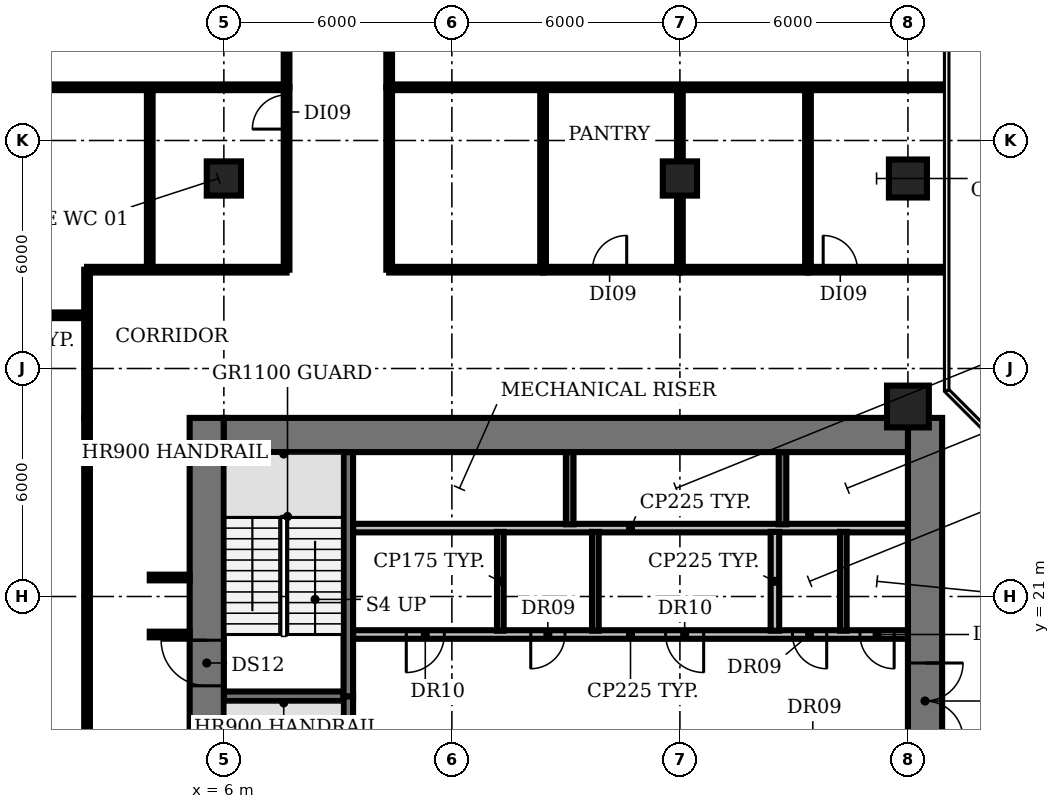
"""IFC4 building model, lengths in metres.
Left out: names, types, materials, properties, quantities, classifications, styles, units other than length and angle.
Written with IfcOpenShell. Run it as: python <this file> out.ifc"""

import sys

from ifc_helpers import new_model, si_unit, direction, frame, frame_2d, origin, origin_2d, place, context, subcontext, project, spatial, rectangle, circle, extrude, element, fill, save


model = new_model("IFC4")
c1 = context("Model", 3, precision=1e-05, world=origin(), true_north=direction((0.0, 1.0)))
c2 = subcontext(c1, "Body", "Model", "MODEL_VIEW")
j1 = project(units=[si_unit("LENGTHUNIT", "METRE"), si_unit("PLANEANGLEUNIT", "RADIAN")], contexts=[c1])
p1 = place(None, origin())
s1 = spatial("IfcSite", under=j1, at=p1, CompositionType="ELEMENT")
p2 = place(p1, origin())
s2 = spatial("IfcBuilding", under=s1, at=p2, CompositionType="ELEMENT")
p3 = place(p2, frame((0.0, 0.0, 15.5)))
s3 = spatial("IfcBuildingStorey", under=s2, at=p3, CompositionType="ELEMENT", Elevation=15.5)
for number, where, z_axis, x_axis in (
    (1, (6.0, 32.0, 0.0), (0.0, 0.0, 1.0), (1.0, 0.0, 0.0)),
    (2, (18.0, 32.0, 0.0), (0.0, 0.0, 1.0), (1.0, 0.0, 0.0)),
):
    element("IfcColumn", number, at=place(p3, frame(where, z_axis=z_axis, x_axis=x_axis)), inside=s3, PredefinedType="COLUMN", context=c2, shape_type="SweptSolid", body=[
        extrude(rectangle(XDim=0.9, YDim=0.9, at=origin_2d()), origin(), (0.0, 0.0, 1.0), 4.15),
    ])
p4 = place(p3, frame((24.0, 26.0, 0.0), z_axis=(0.0, 0.0, 1.0), x_axis=(1.0, 0.0, 0.0)))
e3 = element("IfcColumn", 3, at=p4, inside=s3, PredefinedType="COLUMN", context=c2, shape_type="SweptSolid", body=[
    extrude(circle(Radius=0.55, at=origin_2d()), origin(), (0.0, 0.0, 1.0), 4.15),
])
p5 = place(p3, frame((24.0, 32.0, 0.0), z_axis=(0.0, 0.0, 1.0), x_axis=(1.0, 0.0, 0.0)))
e4 = element("IfcColumn", 4, at=p5, inside=s3, PredefinedType="COLUMN", context=c2, shape_type="SweptSolid", body=[
    extrude(rectangle(XDim=1.0, YDim=1.0, at=origin_2d()), origin(), (0.0, 0.0, 1.0), 4.15),
])
p6 = place(p3, frame((6.0, 18.375, 0.0), z_axis=(0.0, 0.0, 1.0), x_axis=(1.0, 0.0, 0.0)))
e5 = element("IfcWall", 5, at=p6, inside=s3, PredefinedType="SHEAR", context=c2, shape_type="SweptSolid", body=[
    extrude(rectangle(XDim=3.15, YDim=0.25, at=frame_2d((1.575, 0.0))), origin(), (0.0, 0.0, 1.0), 4.15),
])
p7 = place(p3, frame((24.0, 20.0, 0.0), z_axis=(0.0, 0.0, 1.0), x_axis=(-1.0, 0.0, 0.0)))
e6 = element("IfcWall", 6, at=p7, inside=s3, PredefinedType="PARTITIONING", context=c2, shape_type="SweptSolid", body=[
    extrude(rectangle(XDim=14.6, YDim=0.225, at=frame_2d((7.3, 0.0))), origin(), (0.0, 0.0, 1.0), 4.15),
])
p8 = place(p7, frame((12.2, 0.0, 0.0)))
e7 = element("IfcOpeningElement", 7, at=p8, cuts=e6, PredefinedType="OPENING", context=c2, shape_type="SweptSolid", body=[
    extrude(rectangle(XDim=1.0, YDim=2.1, at=frame_2d((0.5, 1.05))), frame((0.0, 0.123, 0.0), z_axis=(0.0, -1.0, 0.0), x_axis=(1.0, 0.0, 0.0)), (0.0, 0.0, 1.0), 0.245),
])
p9 = place(p7, frame((9.025, 0.0, 0.0)))
e8 = element("IfcOpeningElement", 8, at=p9, cuts=e6, PredefinedType="OPENING", context=c2, shape_type="SweptSolid", body=[
    extrude(rectangle(XDim=0.9, YDim=2.1, at=frame_2d((0.45, 1.05))), frame((0.0, 0.123, 0.0), z_axis=(0.0, -1.0, 0.0), x_axis=(1.0, 0.0, 0.0)), (0.0, 0.0, 1.0), 0.245),
])
p10 = place(p7, frame((5.375, 0.0, 0.0)))
e9 = element("IfcOpeningElement", 9, at=p10, cuts=e6, PredefinedType="OPENING", context=c2, shape_type="SweptSolid", body=[
    extrude(rectangle(XDim=1.0, YDim=2.1, at=frame_2d((0.5, 1.05))), frame((0.0, 0.123, 0.0), z_axis=(0.0, -1.0, 0.0), x_axis=(1.0, 0.0, 0.0)), (0.0, 0.0, 1.0), 0.245),
])
p11 = place(p7, frame((2.137, 0.0, 0.0)))
e10 = element("IfcOpeningElement", 10, at=p11, cuts=e6, PredefinedType="OPENING", context=c2, shape_type="SweptSolid", body=[
    extrude(rectangle(XDim=0.9, YDim=2.1, at=frame_2d((0.45, 1.05))), frame((0.0, 0.123, 0.0), z_axis=(0.0, -1.0, 0.0), x_axis=(1.0, 0.0, 0.0)), (0.0, 0.0, 1.0), 0.245),
])
p12 = place(p7, frame((0.363, 0.0, 0.0)))
e11 = element("IfcOpeningElement", 11, at=p12, cuts=e6, PredefinedType="OPENING", context=c2, shape_type="SweptSolid", body=[
    extrude(rectangle(XDim=0.9, YDim=2.1, at=frame_2d((0.45, 1.05))), frame((0.0, 0.123, 0.0), z_axis=(0.0, -1.0, 0.0), x_axis=(1.0, 0.0, 0.0)), (0.0, 0.0, 1.0), 0.245),
])
p13 = place(p3, frame((9.4, 22.8, 0.0), z_axis=(0.0, 0.0, 1.0), x_axis=(1.0, 0.0, 0.0)))
e12 = element("IfcWall", 12, at=p13, inside=s3, PredefinedType="PARTITIONING", context=c2, shape_type="SweptSolid", body=[
    extrude(rectangle(XDim=14.6, YDim=0.225, at=frame_2d((7.3, 0.0))), origin(), (0.0, 0.0, 1.0), 4.15),
])
p14 = place(p3, frame((9.275, 18.375, 0.0), z_axis=(0.0, 0.0, 1.0), x_axis=(0.0, -1.0, 0.0)))
e13 = element("IfcWall", 13, at=p14, inside=s3, PredefinedType="SHEAR", context=c2, shape_type="SweptSolid", body=[
    extrude(rectangle(XDim=6.55, YDim=0.25, at=frame_2d((3.275, 0.0))), origin(), (0.0, 0.0, 1.0), 4.15),
])
p15 = place(p14, frame((5.075, 0.0, 0.0)))
e14 = element("IfcOpeningElement", 14, at=p15, cuts=e13, PredefinedType="OPENING", context=c2, shape_type="SweptSolid", body=[
    extrude(rectangle(XDim=1.0, YDim=2.1, at=frame_2d((0.5, 1.05))), frame((0.0, 0.135, 0.0), z_axis=(0.0, -1.0, 0.0), x_axis=(1.0, 0.0, 0.0)), (0.0, 0.0, 1.0), 0.27),
])
p16 = place(p3, frame((9.275, 18.375, 0.0), z_axis=(0.0, 0.0, 1.0), x_axis=(0.0, 1.0, 0.0)))
e15 = element("IfcWall", 15, at=p16, inside=s3, PredefinedType="SHEAR", context=c2, shape_type="SweptSolid", body=[
    extrude(rectangle(XDim=6.425, YDim=0.25, at=frame_2d((3.212, 0.0))), origin(), (0.0, 0.0, 1.0), 4.15),
])
p17 = place(p3, frame((13.275, 20.1, 0.0), z_axis=(0.0, 0.0, 1.0), x_axis=(0.0, 1.0, 0.0)))
e16 = element("IfcWall", 16, at=p17, inside=s3, PredefinedType="PARTITIONING", context=c2, shape_type="SweptSolid", body=[
    extrude(rectangle(XDim=2.6, YDim=0.175, at=frame_2d((1.3, 0.0))), origin(), (0.0, 0.0, 1.0), 4.15),
])
p18 = place(p3, frame((15.1, 22.9, 0.0), z_axis=(0.0, 0.0, 1.0), x_axis=(0.0, 1.0, 0.0)))
e17 = element("IfcWall", 17, at=p18, inside=s3, PredefinedType="SHEAR", context=c2, shape_type="SweptSolid", body=[
    extrude(rectangle(XDim=1.9, YDim=0.2, at=frame_2d((0.95, 0.0))), origin(), (0.0, 0.0, 1.0), 4.15),
])
p19 = place(p3, frame((15.775, 20.1, 0.0), z_axis=(0.0, 0.0, 1.0), x_axis=(0.0, 1.0, 0.0)))
e18 = element("IfcWall", 18, at=p19, inside=s3, PredefinedType="PARTITIONING", context=c2, shape_type="SweptSolid", body=[
    extrude(rectangle(XDim=2.6, YDim=0.175, at=frame_2d((1.3, 0.0))), origin(), (0.0, 0.0, 1.0), 4.15),
])
p20 = place(p3, frame((20.5, 20.1, 0.0), z_axis=(0.0, 0.0, 1.0), x_axis=(0.0, 1.0, 0.0)))
e19 = element("IfcWall", 19, at=p20, inside=s3, PredefinedType="PARTITIONING", context=c2, shape_type="SweptSolid", body=[
    extrude(rectangle(XDim=2.6, YDim=0.225, at=frame_2d((1.3, 0.0))), origin(), (0.0, 0.0, 1.0), 4.15),
])
p21 = place(p3, frame((20.7, 22.9, 0.0), z_axis=(0.0, 0.0, 1.0), x_axis=(0.0, 1.0, 0.0)))
e20 = element("IfcWall", 20, at=p21, inside=s3, PredefinedType="SHEAR", context=c2, shape_type="SweptSolid", body=[
    extrude(rectangle(XDim=1.9, YDim=0.2, at=frame_2d((0.95, 0.0))), origin(), (0.0, 0.0, 1.0), 4.15),
])
p22 = place(p3, frame((22.3, 20.1, 0.0), z_axis=(0.0, 0.0, 1.0), x_axis=(0.0, 1.0, 0.0)))
e21 = element("IfcWall", 21, at=p22, inside=s3, PredefinedType="PARTITIONING", context=c2, shape_type="SweptSolid", body=[
    extrude(rectangle(XDim=2.6, YDim=0.175, at=frame_2d((1.3, 0.0))), origin(), (0.0, 0.0, 1.0), 4.15),
])
p23 = place(p3, frame((5.55, 4.5, 0.0), z_axis=(0.0, 0.0, 1.0), x_axis=(0.0, 1.0, 0.0)))
e22 = element("IfcWall", 22, at=p23, inside=s3, PredefinedType="SHEAR", context=c2, shape_type="SweptSolid", body=[
    extrude(rectangle(XDim=21.2, YDim=0.9, at=frame_2d((10.6, 0.0))), origin(), (0.0, 0.0, 1.0), 4.15),
])
p24 = place(p23, frame((7.6, 0.0, 0.0)))
e23 = element("IfcOpeningElement", 23, at=p24, cuts=e22, PredefinedType="OPENING", context=c2, shape_type="SweptSolid", body=[
    extrude(rectangle(XDim=1.2, YDim=2.1, at=frame_2d((0.6, 1.05))), frame((0.0, 0.46, 0.0), z_axis=(0.0, -1.0, 0.0), x_axis=(1.0, 0.0, 0.0)), (0.0, 0.0, 1.0), 0.92),
])
p25 = place(p23, frame((14.15, 0.0, 0.0)))
e24 = element("IfcOpeningElement", 24, at=p25, cuts=e22, PredefinedType="OPENING", context=c2, shape_type="SweptSolid", body=[
    extrude(rectangle(XDim=1.2, YDim=2.1, at=frame_2d((0.6, 1.05))), frame((0.0, 0.46, 0.0), z_axis=(0.0, -1.0, 0.0), x_axis=(1.0, 0.0, 0.0)), (0.0, 0.0, 1.0), 0.92),
])
p26 = place(p3, frame((24.45, 25.7, 0.0), z_axis=(0.0, 0.0, 1.0), x_axis=(0.0, -1.0, 0.0)))
e25 = element("IfcWall", 25, at=p26, inside=s3, PredefinedType="SHEAR", context=c2, shape_type="SweptSolid", body=[
    extrude(rectangle(XDim=21.2, YDim=0.9, at=frame_2d((10.6, 0.0))), origin(), (0.0, 0.0, 1.0), 4.15),
])
p27 = place(p26, frame((12.45, 0.0, 0.0)))
e26 = element("IfcOpeningElement", 26, at=p27, cuts=e25, PredefinedType="OPENING", context=c2, shape_type="SweptSolid", body=[
    extrude(rectangle(XDim=0.9, YDim=2.1, at=frame_2d((0.45, 1.05))), frame((0.0, 0.46, 0.0), z_axis=(0.0, -1.0, 0.0), x_axis=(1.0, 0.0, 0.0)), (0.0, 0.0, 1.0), 0.92),
])
p28 = place(p26, frame((6.45, 0.0, 0.0)))
e27 = element("IfcOpeningElement", 27, at=p28, cuts=e25, PredefinedType="OPENING", context=c2, shape_type="SweptSolid", body=[
    extrude(rectangle(XDim=2.0, YDim=2.1, at=frame_2d((1.0, 1.05))), frame((0.0, 0.46, 0.0), z_axis=(0.0, -1.0, 0.0), x_axis=(1.0, 0.0, 0.0)), (0.0, 0.0, 1.0), 0.92),
])
p29 = place(p3, frame((6.0, 25.25, 0.0), z_axis=(0.0, 0.0, 1.0), x_axis=(1.0, 0.0, 0.0)))
e28 = element("IfcWall", 28, at=p29, inside=s3, PredefinedType="SHEAR", context=c2, shape_type="SweptSolid", body=[
    extrude(rectangle(XDim=18.0, YDim=0.9, at=frame_2d((9.0, 0.0))), origin(), (0.0, 0.0, 1.0), 4.15),
])
p30 = place(p3, frame((-0.97, 28.4, 0.0), z_axis=(0.0, 0.0, 1.0), x_axis=(1.0, 0.0, 0.0)))
e29 = element("IfcWall", 29, at=p30, inside=s3, PredefinedType="PARTITIONING", context=c2, shape_type="SweptSolid", body=[
    extrude(rectangle(XDim=3.37, YDim=0.15, at=frame_2d((1.685, 0.0))), origin(), (0.0, 0.0, 1.0), 3.08),
])
p31 = place(p3, frame((-0.97, 34.4, 0.0), z_axis=(0.0, 0.0, 1.0), x_axis=(1.0, 0.0, 0.0)))
e30 = element("IfcWall", 30, at=p31, inside=s3, PredefinedType="PARTITIONING", context=c2, shape_type="SweptSolid", body=[
    extrude(rectangle(XDim=8.62, YDim=0.15, at=frame_2d((4.31, 0.0))), origin(), (0.0, 0.0, 1.0), 3.08),
])
p32 = place(p3, frame((2.4, 4.5, 0.0), z_axis=(0.0, 0.0, 1.0), x_axis=(0.0, 1.0, 0.0)))
e31 = element("IfcWall", 31, at=p32, inside=s3, PredefinedType="PARTITIONING", context=c2, shape_type="SweptSolid", body=[
    extrude(rectangle(XDim=21.2, YDim=0.15, at=frame_2d((10.6, 0.0))), origin(), (0.0, 0.0, 1.0), 3.08),
])
p33 = place(p32, frame((10.8, 0.0, 0.0)))
e32 = element("IfcOpeningElement", 32, at=p33, cuts=e31, PredefinedType="OPENING", context=c2, shape_type="SweptSolid", body=[
    extrude(rectangle(XDim=1.2, YDim=2.1, at=frame_2d((0.6, 1.05))), frame((0.0, 0.085, 0.0), z_axis=(0.0, -1.0, 0.0), x_axis=(1.0, 0.0, 0.0)), (0.0, 0.0, 1.0), 0.17),
])
p34 = place(p3, frame((2.4, 25.7, 0.0), z_axis=(0.0, 0.0, 1.0), x_axis=(0.0, 1.0, 0.0)))
e33 = element("IfcWall", 33, at=p34, inside=s3, PredefinedType="PARTITIONING", context=c2, shape_type="SweptSolid", body=[
    extrude(rectangle(XDim=3.9, YDim=0.15, at=frame_2d((1.95, 0.0))), origin(), (0.0, 0.0, 1.0), 3.08),
])
p35 = place(p3, frame((2.4, 29.6, 0.0), z_axis=(0.0, 0.0, 1.0), x_axis=(1.0, 0.0, 0.0)))
e34 = element("IfcWall", 34, at=p35, inside=s3, PredefinedType="PARTITIONING", context=c2, shape_type="SweptSolid", body=[
    extrude(rectangle(XDim=5.25, YDim=0.15, at=frame_2d((2.625, 0.0))), origin(), (0.0, 0.0, 1.0), 3.08),
])
for number, where, z_axis, x_axis in (
    (35, (4.05, 20.0, 0.0), (0.0, 0.0, 1.0), (1.0, 0.0, 0.0)),
    (36, (4.05, 21.5, 0.0), (0.0, 0.0, 1.0), (1.0, 0.0, 0.0)),
):
    element("IfcWall", number, at=place(p3, frame(where, z_axis=z_axis, x_axis=x_axis)), inside=s3, PredefinedType="PARTITIONING", context=c2, shape_type="SweptSolid", body=[
        extrude(rectangle(XDim=1.05, YDim=0.15, at=frame_2d((0.525, 0.0))), origin(), (0.0, 0.0, 1.0), 3.08),
    ])
p36 = place(p3, frame((4.05, 29.6, 0.0), z_axis=(0.0, 0.0, 1.0), x_axis=(0.0, 1.0, 0.0)))
e37 = element("IfcWall", 37, at=p36, inside=s3, PredefinedType="PARTITIONING", context=c2, shape_type="SweptSolid", body=[
    extrude(rectangle(XDim=4.8, YDim=0.15, at=frame_2d((2.4, 0.0))), origin(), (0.0, 0.0, 1.0), 3.08),
])
p37 = place(p3, frame((7.65, 29.6, 0.0), z_axis=(0.0, 0.0, 1.0), x_axis=(0.0, 1.0, 0.0)))
e38 = element("IfcWall", 38, at=p37, inside=s3, PredefinedType="PARTITIONING", context=c2, shape_type="SweptSolid", body=[
    extrude(rectangle(XDim=4.8, YDim=0.15, at=frame_2d((2.4, 0.0))), origin(), (0.0, 0.0, 1.0), 3.08),
])
p38 = place(p37, frame((3.7, 0.0, 0.0)))
e39 = element("IfcOpeningElement", 39, at=p38, cuts=e38, PredefinedType="OPENING", context=c2, shape_type="SweptSolid", body=[
    extrude(rectangle(XDim=0.9, YDim=2.1, at=frame_2d((0.45, 1.05))), frame((0.0, 0.085, 0.0), z_axis=(0.0, -1.0, 0.0), x_axis=(1.0, 0.0, 0.0)), (0.0, 0.0, 1.0), 0.17),
])
p39 = place(p3, frame((7.65, 34.4, 0.0), z_axis=(0.0, 0.0, 1.0), x_axis=(0.0, 1.0, 0.0)))
e40 = element("IfcWall", 40, at=p39, inside=s3, PredefinedType="PARTITIONING", context=c2, shape_type="SweptSolid", body=[
    extrude(rectangle(XDim=4.6, YDim=0.15, at=frame_2d((2.3, 0.0))), origin(), (0.0, 0.0, 1.0), 3.08),
])
p40 = place(p39, frame((1.7, 0.0, 0.0)))
e41 = element("IfcOpeningElement", 41, at=p40, cuts=e40, PredefinedType="OPENING", context=c2, shape_type="SweptSolid", body=[
    extrude(rectangle(XDim=0.9, YDim=2.1, at=frame_2d((0.45, 1.05))), frame((0.0, 0.085, 0.0), z_axis=(0.0, -1.0, 0.0), x_axis=(1.0, 0.0, 0.0)), (0.0, 0.0, 1.0), 0.17),
])
p41 = place(p3, frame((10.35, 29.6, 0.0), z_axis=(0.0, 0.0, 1.0), x_axis=(0.0, 1.0, 0.0)))
e42 = element("IfcWall", 42, at=p41, inside=s3, PredefinedType="PARTITIONING", context=c2, shape_type="SweptSolid", body=[
    extrude(rectangle(XDim=4.8, YDim=0.15, at=frame_2d((2.4, 0.0))), origin(), (0.0, 0.0, 1.0), 3.08),
])
p42 = place(p3, frame((10.35, 29.6, 0.0), z_axis=(0.0, 0.0, 1.0), x_axis=(1.0, 0.0, 0.0)))
e43 = element("IfcWall", 43, at=p42, inside=s3, PredefinedType="PARTITIONING", context=c2, shape_type="SweptSolid", body=[
    extrude(rectangle(XDim=4.05, YDim=0.15, at=frame_2d((2.025, 0.0))), origin(), (0.0, 0.0, 1.0), 3.08),
])
p43 = place(p3, frame((10.35, 34.4, 0.0), z_axis=(0.0, 0.0, 1.0), x_axis=(1.0, 0.0, 0.0)))
e44 = element("IfcWall", 44, at=p43, inside=s3, PredefinedType="PARTITIONING", context=c2, shape_type="SweptSolid", body=[
    extrude(rectangle(XDim=14.62, YDim=0.15, at=frame_2d((7.31, 0.0))), origin(), (0.0, 0.0, 1.0), 3.08),
])
p44 = place(p3, frame((10.35, 51.0, 0.0), z_axis=(0.0, 0.0, 1.0), x_axis=(0.0, -1.0, 0.0)))
e45 = element("IfcWall", 45, at=p44, inside=s3, PredefinedType="PARTITIONING", context=c2, shape_type="SweptSolid", body=[
    extrude(rectangle(XDim=16.6, YDim=0.15, at=frame_2d((8.3, 0.0))), origin(), (0.0, 0.0, 1.0), 3.08),
])
p45 = place(p44, frame((7.7, 0.0, 0.0)))
e46 = element("IfcOpeningElement", 46, at=p45, cuts=e45, PredefinedType="OPENING", context=c2, shape_type="SweptSolid", body=[
    extrude(rectangle(XDim=1.2, YDim=2.1, at=frame_2d((0.6, 1.05))), frame((0.0, 0.085, 0.0), z_axis=(0.0, -1.0, 0.0), x_axis=(1.0, 0.0, 0.0)), (0.0, 0.0, 1.0), 0.17),
])
p46 = place(p3, frame((14.4, 29.6, 0.0), z_axis=(0.0, 0.0, 1.0), x_axis=(0.0, 1.0, 0.0)))
e47 = element("IfcWall", 47, at=p46, inside=s3, PredefinedType="PARTITIONING", context=c2, shape_type="SweptSolid", body=[
    extrude(rectangle(XDim=4.8, YDim=0.15, at=frame_2d((2.4, 0.0))), origin(), (0.0, 0.0, 1.0), 3.08),
])
p47 = place(p3, frame((14.4, 29.6, 0.0), z_axis=(0.0, 0.0, 1.0), x_axis=(1.0, 0.0, 0.0)))
e48 = element("IfcWall", 48, at=p47, inside=s3, PredefinedType="PARTITIONING", context=c2, shape_type="SweptSolid", body=[
    extrude(rectangle(XDim=3.6, YDim=0.15, at=frame_2d((1.8, 0.0))), origin(), (0.0, 0.0, 1.0), 3.08),
])
p48 = place(p47, frame((1.3, 0.0, 0.0)))
e49 = element("IfcOpeningElement", 49, at=p48, cuts=e48, PredefinedType="OPENING", context=c2, shape_type="SweptSolid", body=[
    extrude(rectangle(XDim=0.9, YDim=2.1, at=frame_2d((0.45, 1.05))), frame((0.0, 0.085, 0.0), z_axis=(0.0, -1.0, 0.0), x_axis=(1.0, 0.0, 0.0)), (0.0, 0.0, 1.0), 0.17),
])
p49 = place(p3, frame((18.0, 29.6, 0.0), z_axis=(0.0, 0.0, 1.0), x_axis=(0.0, 1.0, 0.0)))
e50 = element("IfcWall", 50, at=p49, inside=s3, PredefinedType="PARTITIONING", context=c2, shape_type="SweptSolid", body=[
    extrude(rectangle(XDim=4.8, YDim=0.15, at=frame_2d((2.4, 0.0))), origin(), (0.0, 0.0, 1.0), 3.08),
])
p50 = place(p3, frame((18.0, 29.6, 0.0), z_axis=(0.0, 0.0, 1.0), x_axis=(1.0, 0.0, 0.0)))
e51 = element("IfcWall", 51, at=p50, inside=s3, PredefinedType="PARTITIONING", context=c2, shape_type="SweptSolid", body=[
    extrude(rectangle(XDim=3.37, YDim=0.15, at=frame_2d((1.685, 0.0))), origin(), (0.0, 0.0, 1.0), 3.08),
])
p51 = place(p3, frame((21.37, 29.6, 0.0), z_axis=(0.0, 0.0, 1.0), x_axis=(0.0, 1.0, 0.0)))
e52 = element("IfcWall", 52, at=p51, inside=s3, PredefinedType="PARTITIONING", context=c2, shape_type="SweptSolid", body=[
    extrude(rectangle(XDim=4.8, YDim=0.15, at=frame_2d((2.4, 0.0))), origin(), (0.0, 0.0, 1.0), 3.08),
])
p52 = place(p3, frame((21.37, 29.6, 0.0), z_axis=(0.0, 0.0, 1.0), x_axis=(1.0, 0.0, 0.0)))
e53 = element("IfcWall", 53, at=p52, inside=s3, PredefinedType="PARTITIONING", context=c2, shape_type="SweptSolid", body=[
    extrude(rectangle(XDim=3.6, YDim=0.15, at=frame_2d((1.8, 0.0))), origin(), (0.0, 0.0, 1.0), 3.08),
])
p53 = place(p52, frame((0.4, 0.0, 0.0)))
e54 = element("IfcOpeningElement", 54, at=p53, cuts=e53, PredefinedType="OPENING", context=c2, shape_type="SweptSolid", body=[
    extrude(rectangle(XDim=0.9, YDim=2.1, at=frame_2d((0.45, 1.05))), frame((0.0, 0.085, 0.0), z_axis=(0.0, -1.0, 0.0), x_axis=(1.0, 0.0, 0.0)), (0.0, 0.0, 1.0), 0.17),
])
p54 = place(p8, origin())
e55 = element("IfcDoor", 55, at=p54, inside=s3, OperationType="SINGLE_SWING_RIGHT", PredefinedType="DOOR", context=c2, shape_type="SweptSolid", body=[
    extrude(rectangle(XDim=1.0, YDim=2.1, at=frame_2d((0.5, 1.05))), frame((0.0, 0.025, 0.0), z_axis=(0.0, -1.0, 0.0), x_axis=(1.0, 0.0, 0.0)), (0.0, 0.0, 1.0), 0.05),
])
fill(e7, e55)
p55 = place(p9, origin())
e56 = element("IfcDoor", 56, at=p55, inside=s3, OperationType="SINGLE_SWING_RIGHT", PredefinedType="DOOR", context=c2, shape_type="SweptSolid", body=[
    extrude(rectangle(XDim=0.9, YDim=2.1, at=frame_2d((0.45, 1.05))), frame((0.0, 0.025, 0.0), z_axis=(0.0, -1.0, 0.0), x_axis=(1.0, 0.0, 0.0)), (0.0, 0.0, 1.0), 0.05),
])
fill(e8, e56)
p56 = place(p10, origin())
e57 = element("IfcDoor", 57, at=p56, inside=s3, OperationType="SINGLE_SWING_LEFT", PredefinedType="DOOR", context=c2, shape_type="SweptSolid", body=[
    extrude(rectangle(XDim=1.0, YDim=2.1, at=frame_2d((0.5, 1.05))), frame((0.0, 0.025, 0.0), z_axis=(0.0, -1.0, 0.0), x_axis=(1.0, 0.0, 0.0)), (0.0, 0.0, 1.0), 0.05),
])
fill(e9, e57)
p57 = place(p11, origin())
e58 = element("IfcDoor", 58, at=p57, inside=s3, OperationType="SINGLE_SWING_LEFT", PredefinedType="DOOR", context=c2, shape_type="SweptSolid", body=[
    extrude(rectangle(XDim=0.9, YDim=2.1, at=frame_2d((0.45, 1.05))), frame((0.0, 0.025, 0.0), z_axis=(0.0, -1.0, 0.0), x_axis=(1.0, 0.0, 0.0)), (0.0, 0.0, 1.0), 0.05),
])
fill(e10, e58)
p58 = place(p12, origin())
e59 = element("IfcDoor", 59, at=p58, inside=s3, OperationType="SINGLE_SWING_LEFT", PredefinedType="DOOR", context=c2, shape_type="SweptSolid", body=[
    extrude(rectangle(XDim=0.9, YDim=2.1, at=frame_2d((0.45, 1.05))), frame((0.0, 0.025, 0.0), z_axis=(0.0, -1.0, 0.0), x_axis=(1.0, 0.0, 0.0)), (0.0, 0.0, 1.0), 0.05),
])
fill(e11, e59)
p59 = place(p25, origin())
e60 = element("IfcDoor", 60, at=p59, inside=s3, OperationType="SINGLE_SWING_RIGHT", PredefinedType="DOOR", context=c2, shape_type="SweptSolid", body=[
    extrude(rectangle(XDim=1.2, YDim=2.1, at=frame_2d((0.6, 1.05))), frame((0.0, 0.025, 0.0), z_axis=(0.0, -1.0, 0.0), x_axis=(1.0, 0.0, 0.0)), (0.0, 0.0, 1.0), 0.05),
])
fill(e24, e60)
p60 = place(p28, origin())
e61 = element("IfcDoor", 61, at=p60, inside=s3, OperationType="DOUBLE_DOOR_SINGLE_SWING", PredefinedType="DOOR", context=c2, shape_type="SweptSolid", body=[
    extrude(rectangle(XDim=2.0, YDim=2.1, at=frame_2d((1.0, 1.05))), frame((0.0, 0.025, 0.0), z_axis=(0.0, -1.0, 0.0), x_axis=(1.0, 0.0, 0.0)), (0.0, 0.0, 1.0), 0.05),
])
fill(e27, e61)
p61 = place(p38, origin())
e62 = element("IfcDoor", 62, at=p61, inside=s3, OperationType="SINGLE_SWING_LEFT", PredefinedType="DOOR", context=c2, shape_type="SweptSolid", body=[
    extrude(rectangle(XDim=0.9, YDim=2.1, at=frame_2d((0.45, 1.05))), frame((0.0, 0.025, 0.0), z_axis=(0.0, -1.0, 0.0), x_axis=(1.0, 0.0, 0.0)), (0.0, 0.0, 1.0), 0.05),
])
fill(e39, e62)
p62 = place(p48, origin())
e63 = element("IfcDoor", 63, at=p62, inside=s3, OperationType="SINGLE_SWING_RIGHT", PredefinedType="DOOR", context=c2, shape_type="SweptSolid", body=[
    extrude(rectangle(XDim=0.9, YDim=2.1, at=frame_2d((0.45, 1.05))), frame((0.0, 0.025, 0.0), z_axis=(0.0, -1.0, 0.0), x_axis=(1.0, 0.0, 0.0)), (0.0, 0.0, 1.0), 0.05),
])
fill(e49, e63)
p63 = place(p53, origin())
e64 = element("IfcDoor", 64, at=p63, inside=s3, OperationType="SINGLE_SWING_LEFT", PredefinedType="DOOR", context=c2, shape_type="SweptSolid", body=[
    extrude(rectangle(XDim=0.9, YDim=2.1, at=frame_2d((0.45, 1.05))), frame((0.0, 0.025, 0.0), z_axis=(0.0, -1.0, 0.0), x_axis=(1.0, 0.0, 0.0)), (0.0, 0.0, 1.0), 0.05),
])
fill(e54, e64)
save(model, sys.argv[1])
